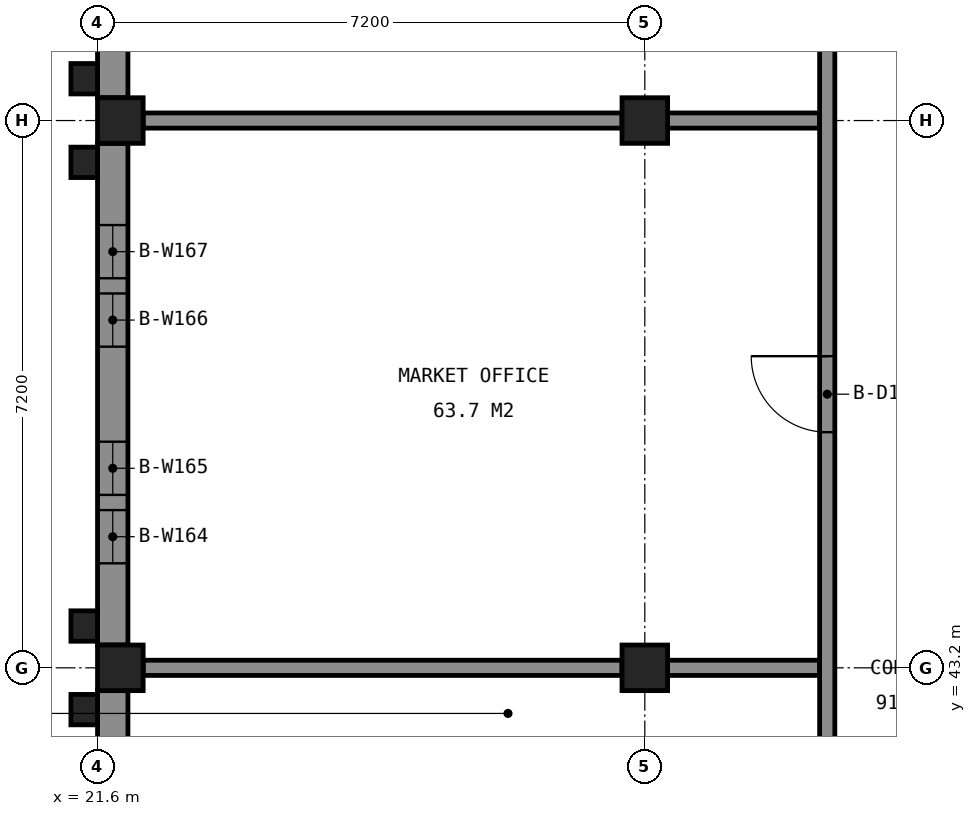
"""IFC4 building model, lengths in metres.
Left out: names, types, materials, properties, quantities, classifications, styles, units other than length and angle.
Written with IfcOpenShell. Run it as: python <this file> out.ifc"""

import sys

from ifc_helpers import new_model, si_unit, direction, frame, frame_2d, origin, origin_2d, place, context, subcontext, project, spatial, rectangle, extrude, element, fill, save


model = new_model("IFC4")
c1 = context("Model", 3, precision=1e-05, world=origin(), true_north=direction((0.0, 1.0)))
c2 = subcontext(c1, "Body", "Model", "MODEL_VIEW")
j1 = project(units=[si_unit("LENGTHUNIT", "METRE"), si_unit("PLANEANGLEUNIT", "RADIAN")], contexts=[c1])
p1 = place(None, origin())
s1 = spatial("IfcSite", under=j1, at=p1, CompositionType="ELEMENT")
p2 = place(p1, origin())
s2 = spatial("IfcBuilding", under=s1, at=p2, CompositionType="ELEMENT")
p3 = place(p2, frame((0.0, 0.0, 14.4)))
s3 = spatial("IfcBuildingStorey", under=s2, at=p3, CompositionType="ELEMENT", Elevation=14.4)
for number, where, z_axis, x_axis in (
    (1, (21.9, 43.2, 0.0), (0.0, 0.0, 1.0), (1.0, 0.0, 0.0)),
    (2, (21.9, 50.4, 0.0), (0.0, 0.0, 1.0), (1.0, 0.0, 0.0)),
):
    element("IfcColumn", number, at=place(p3, frame(where, z_axis=z_axis, x_axis=x_axis)), inside=s3, PredefinedType="COLUMN", context=c2, shape_type="SweptSolid", body=[
        extrude(rectangle(XDim=0.6, YDim=0.6, at=origin_2d()), origin(), (0.0, 0.0, 1.0), 4.144),
    ])
for number, where, z_axis, x_axis in (
    (3, (28.8, 43.2, 0.0), (0.0, 0.0, 1.0), (1.0, 0.0, 0.0)),
    (4, (28.8, 50.4, 0.0), (0.0, 0.0, 1.0), (1.0, 0.0, 0.0)),
):
    element("IfcColumn", number, at=place(p3, frame(where, z_axis=z_axis, x_axis=x_axis)), inside=s3, PredefinedType="COLUMN", context=c2, shape_type="SweptSolid", body=[
        extrude(rectangle(XDim=0.6, YDim=0.6, at=origin_2d()), origin(), (0.0, 0.0, 1.0), 4.911),
    ])
p4 = place(p3, frame((21.8, 36.3, 0.0), z_axis=(0.0, 0.0, 1.0), x_axis=(0.0, 1.0, 0.0)))
e5 = element("IfcWall", 5, at=p4, inside=s3, PredefinedType="SOLIDWALL", context=c2, shape_type="SweptSolid", body=[
    extrude(rectangle(XDim=6.6, YDim=0.4, at=frame_2d((3.3, 0.0))), origin(), (0.0, 0.0, 1.0), 4.133),
])
p5 = place(p4, frame((1.075, 0.0, 1.6)))
e6 = element("IfcOpeningElement", 6, at=p5, cuts=e5, PredefinedType="OPENING", context=c2, shape_type="SweptSolid", body=[
    extrude(rectangle(XDim=0.7, YDim=1.2, at=frame_2d((0.35, 0.6))), frame((0.0, 0.21, 0.0), z_axis=(0.0, -1.0, 0.0), x_axis=(1.0, 0.0, 0.0)), (0.0, 0.0, 1.0), 0.42),
])
p6 = place(p4, frame((1.975, 0.0, 1.6)))
e7 = element("IfcOpeningElement", 7, at=p6, cuts=e5, PredefinedType="OPENING", context=c2, shape_type="SweptSolid", body=[
    extrude(rectangle(XDim=0.7, YDim=1.2, at=frame_2d((0.35, 0.6))), frame((0.0, 0.21, 0.0), z_axis=(0.0, -1.0, 0.0), x_axis=(1.0, 0.0, 0.0)), (0.0, 0.0, 1.0), 0.42),
])
p7 = place(p4, frame((3.925, 0.0, 1.6)))
e8 = element("IfcOpeningElement", 8, at=p7, cuts=e5, PredefinedType="OPENING", context=c2, shape_type="SweptSolid", body=[
    extrude(rectangle(XDim=0.7, YDim=1.2, at=frame_2d((0.35, 0.6))), frame((0.0, 0.21, 0.0), z_axis=(0.0, -1.0, 0.0), x_axis=(1.0, 0.0, 0.0)), (0.0, 0.0, 1.0), 0.42),
])
p8 = place(p4, frame((4.825, 0.0, 1.6)))
e9 = element("IfcOpeningElement", 9, at=p8, cuts=e5, PredefinedType="OPENING", context=c2, shape_type="SweptSolid", body=[
    extrude(rectangle(XDim=0.7, YDim=1.2, at=frame_2d((0.35, 0.6))), frame((0.0, 0.21, 0.0), z_axis=(0.0, -1.0, 0.0), x_axis=(1.0, 0.0, 0.0)), (0.0, 0.0, 1.0), 0.42),
])
p9 = place(p3, frame((21.8, 43.5, 0.0), z_axis=(0.0, 0.0, 1.0), x_axis=(0.0, 1.0, 0.0)))
e10 = element("IfcWall", 10, at=p9, inside=s3, PredefinedType="SOLIDWALL", context=c2, shape_type="SweptSolid", body=[
    extrude(rectangle(XDim=6.6, YDim=0.4, at=frame_2d((3.3, 0.0))), origin(), (0.0, 0.0, 1.0), 4.133),
])
p10 = place(p9, frame((1.075, 0.0, 1.6)))
e11 = element("IfcOpeningElement", 11, at=p10, cuts=e10, PredefinedType="OPENING", context=c2, shape_type="SweptSolid", body=[
    extrude(rectangle(XDim=0.7, YDim=1.2, at=frame_2d((0.35, 0.6))), frame((0.0, 0.21, 0.0), z_axis=(0.0, -1.0, 0.0), x_axis=(1.0, 0.0, 0.0)), (0.0, 0.0, 1.0), 0.42),
])
p11 = place(p9, frame((1.975, 0.0, 1.6)))
e12 = element("IfcOpeningElement", 12, at=p11, cuts=e10, PredefinedType="OPENING", context=c2, shape_type="SweptSolid", body=[
    extrude(rectangle(XDim=0.7, YDim=1.2, at=frame_2d((0.35, 0.6))), frame((0.0, 0.21, 0.0), z_axis=(0.0, -1.0, 0.0), x_axis=(1.0, 0.0, 0.0)), (0.0, 0.0, 1.0), 0.42),
])
p12 = place(p9, frame((3.925, 0.0, 1.6)))
e13 = element("IfcOpeningElement", 13, at=p12, cuts=e10, PredefinedType="OPENING", context=c2, shape_type="SweptSolid", body=[
    extrude(rectangle(XDim=0.7, YDim=1.2, at=frame_2d((0.35, 0.6))), frame((0.0, 0.21, 0.0), z_axis=(0.0, -1.0, 0.0), x_axis=(1.0, 0.0, 0.0)), (0.0, 0.0, 1.0), 0.42),
])
p13 = place(p9, frame((4.825, 0.0, 1.6)))
e14 = element("IfcOpeningElement", 14, at=p13, cuts=e10, PredefinedType="OPENING", context=c2, shape_type="SweptSolid", body=[
    extrude(rectangle(XDim=0.7, YDim=1.2, at=frame_2d((0.35, 0.6))), frame((0.0, 0.21, 0.0), z_axis=(0.0, -1.0, 0.0), x_axis=(1.0, 0.0, 0.0)), (0.0, 0.0, 1.0), 0.42),
])
p14 = place(p3, frame((21.8, 50.7, 0.0), z_axis=(0.0, 0.0, 1.0), x_axis=(0.0, 1.0, 0.0)))
e15 = element("IfcWall", 15, at=p14, inside=s3, PredefinedType="SOLIDWALL", context=c2, shape_type="SweptSolid", body=[
    extrude(rectangle(XDim=6.6, YDim=0.4, at=frame_2d((3.3, 0.0))), origin(), (0.0, 0.0, 1.0), 4.133),
])
p15 = place(p14, frame((1.075, 0.0, 1.6)))
e16 = element("IfcOpeningElement", 16, at=p15, cuts=e15, PredefinedType="OPENING", context=c2, shape_type="SweptSolid", body=[
    extrude(rectangle(XDim=0.7, YDim=1.2, at=frame_2d((0.35, 0.6))), frame((0.0, 0.21, 0.0), z_axis=(0.0, -1.0, 0.0), x_axis=(1.0, 0.0, 0.0)), (0.0, 0.0, 1.0), 0.42),
])
p16 = place(p14, frame((1.975, 0.0, 1.6)))
e17 = element("IfcOpeningElement", 17, at=p16, cuts=e15, PredefinedType="OPENING", context=c2, shape_type="SweptSolid", body=[
    extrude(rectangle(XDim=0.7, YDim=1.2, at=frame_2d((0.35, 0.6))), frame((0.0, 0.21, 0.0), z_axis=(0.0, -1.0, 0.0), x_axis=(1.0, 0.0, 0.0)), (0.0, 0.0, 1.0), 0.42),
])
p17 = place(p14, frame((3.925, 0.0, 1.6)))
e18 = element("IfcOpeningElement", 18, at=p17, cuts=e15, PredefinedType="OPENING", context=c2, shape_type="SweptSolid", body=[
    extrude(rectangle(XDim=0.7, YDim=1.2, at=frame_2d((0.35, 0.6))), frame((0.0, 0.21, 0.0), z_axis=(0.0, -1.0, 0.0), x_axis=(1.0, 0.0, 0.0)), (0.0, 0.0, 1.0), 0.42),
])
p18 = place(p14, frame((4.825, 0.0, 1.6)))
e19 = element("IfcOpeningElement", 19, at=p18, cuts=e15, PredefinedType="OPENING", context=c2, shape_type="SweptSolid", body=[
    extrude(rectangle(XDim=0.7, YDim=1.2, at=frame_2d((0.35, 0.6))), frame((0.0, 0.21, 0.0), z_axis=(0.0, -1.0, 0.0), x_axis=(1.0, 0.0, 0.0)), (0.0, 0.0, 1.0), 0.42),
])
for number, where, z_axis, x_axis in (
    (20, (21.425, 42.65, 0.0), (0.0, 0.0, 1.0), (1.0, 0.0, 0.0)),
    (21, (21.425, 43.75, 0.0), (0.0, 0.0, 1.0), (1.0, 0.0, 0.0)),
    (22, (21.425, 49.85, 0.0), (0.0, 0.0, 1.0), (1.0, 0.0, 0.0)),
    (23, (21.425, 50.95, 0.0), (0.0, 0.0, 1.0), (1.0, 0.0, 0.0)),
):
    element("IfcColumn", number, at=place(p3, frame(where, z_axis=z_axis, x_axis=x_axis)), inside=s3, PredefinedType="COLUMN", context=c2, shape_type="SweptSolid", body=[
        extrude(rectangle(XDim=0.35, YDim=0.4, at=origin_2d()), origin(), (0.0, 0.0, 1.0), 4.1),
    ])
p19 = place(p3, frame((22.2, 43.2, 0.0), z_axis=(0.0, 0.0, 1.0), x_axis=(1.0, 0.0, 0.0)))
e24 = element("IfcWall", 24, at=p19, inside=s3, PredefinedType="PARTITIONING", context=c2, shape_type="SweptSolid", body=[
    extrude(rectangle(XDim=6.3, YDim=0.2, at=frame_2d((3.15, 0.0))), origin(), (0.0, 0.0, 1.0), 4.0),
])
p20 = place(p3, frame((29.1, 43.2, 0.0), z_axis=(0.0, 0.0, 1.0), x_axis=(1.0, 0.0, 0.0)))
e25 = element("IfcWall", 25, at=p20, inside=s3, PredefinedType="PARTITIONING", context=c2, shape_type="SweptSolid", body=[
    extrude(rectangle(XDim=2.0, YDim=0.2, at=frame_2d((1.0, 0.0))), origin(), (0.0, 0.0, 1.0), 4.0),
])
p21 = place(p3, frame((22.2, 50.4, 0.0), z_axis=(0.0, 0.0, 1.0), x_axis=(1.0, 0.0, 0.0)))
e26 = element("IfcWall", 26, at=p21, inside=s3, PredefinedType="PARTITIONING", context=c2, shape_type="SweptSolid", body=[
    extrude(rectangle(XDim=6.3, YDim=0.2, at=frame_2d((3.15, 0.0))), origin(), (0.0, 0.0, 1.0), 4.0),
])
p22 = place(p3, frame((29.1, 50.4, 0.0), z_axis=(0.0, 0.0, 1.0), x_axis=(1.0, 0.0, 0.0)))
e27 = element("IfcWall", 27, at=p22, inside=s3, PredefinedType="PARTITIONING", context=c2, shape_type="SweptSolid", body=[
    extrude(rectangle(XDim=2.0, YDim=0.2, at=frame_2d((1.0, 0.0))), origin(), (0.0, 0.0, 1.0), 4.0),
])
p23 = place(p3, frame((31.2, 29.2, 0.0), z_axis=(0.0, 0.0, 1.0), x_axis=(0.0, 1.0, 0.0)))
e28 = element("IfcWall", 28, at=p23, inside=s3, PredefinedType="PARTITIONING", context=c2, shape_type="SweptSolid", body=[
    extrude(rectangle(XDim=42.4, YDim=0.2, at=frame_2d((21.2, 0.0))), origin(), (0.0, 0.0, 1.0), 4.0),
])
p24 = place(p23, frame((2.7, 0.0, 0.0)))
e29 = element("IfcOpeningElement", 29, at=p24, cuts=e28, PredefinedType="OPENING", context=c2, shape_type="SweptSolid", body=[
    extrude(rectangle(XDim=1.0, YDim=2.1, at=frame_2d((0.5, 1.05))), frame((0.0, 0.11, 0.0), z_axis=(0.0, -1.0, 0.0), x_axis=(1.0, 0.0, 0.0)), (0.0, 0.0, 1.0), 0.22),
])
p25 = place(p23, frame((9.9, 0.0, 0.0)))
e30 = element("IfcOpeningElement", 30, at=p25, cuts=e28, PredefinedType="OPENING", context=c2, shape_type="SweptSolid", body=[
    extrude(rectangle(XDim=1.0, YDim=2.1, at=frame_2d((0.5, 1.05))), frame((0.0, 0.11, 0.0), z_axis=(0.0, -1.0, 0.0), x_axis=(1.0, 0.0, 0.0)), (0.0, 0.0, 1.0), 0.22),
])
p26 = place(p23, frame((17.1, 0.0, 0.0)))
e31 = element("IfcOpeningElement", 31, at=p26, cuts=e28, PredefinedType="OPENING", context=c2, shape_type="SweptSolid", body=[
    extrude(rectangle(XDim=1.0, YDim=2.1, at=frame_2d((0.5, 1.05))), frame((0.0, 0.11, 0.0), z_axis=(0.0, -1.0, 0.0), x_axis=(1.0, 0.0, 0.0)), (0.0, 0.0, 1.0), 0.22),
])
p27 = place(p23, frame((24.3, 0.0, 0.0)))
e32 = element("IfcOpeningElement", 32, at=p27, cuts=e28, PredefinedType="OPENING", context=c2, shape_type="SweptSolid", body=[
    extrude(rectangle(XDim=1.0, YDim=2.1, at=frame_2d((0.5, 1.05))), frame((0.0, 0.11, 0.0), z_axis=(0.0, -1.0, 0.0), x_axis=(1.0, 0.0, 0.0)), (0.0, 0.0, 1.0), 0.22),
])
p28 = place(p23, frame((31.5, 0.0, 0.0)))
e33 = element("IfcOpeningElement", 33, at=p28, cuts=e28, PredefinedType="OPENING", context=c2, shape_type="SweptSolid", body=[
    extrude(rectangle(XDim=1.0, YDim=2.1, at=frame_2d((0.5, 1.05))), frame((0.0, 0.11, 0.0), z_axis=(0.0, -1.0, 0.0), x_axis=(1.0, 0.0, 0.0)), (0.0, 0.0, 1.0), 0.22),
])
p29 = place(p23, frame((38.7, 0.0, 0.0)))
e34 = element("IfcOpeningElement", 34, at=p29, cuts=e28, PredefinedType="OPENING", context=c2, shape_type="SweptSolid", body=[
    extrude(rectangle(XDim=1.0, YDim=2.1, at=frame_2d((0.5, 1.05))), frame((0.0, 0.11, 0.0), z_axis=(0.0, -1.0, 0.0), x_axis=(1.0, 0.0, 0.0)), (0.0, 0.0, 1.0), 0.22),
])
p30 = place(p10, origin())
e35 = element("IfcWindow", 35, at=p30, inside=s3, PartitioningType="SINGLE_PANEL", PredefinedType="WINDOW", context=c2, shape_type="SweptSolid", body=[
    extrude(rectangle(XDim=0.7, YDim=1.2, at=frame_2d((0.35, 0.6))), frame((0.0, 0.03, 0.0), z_axis=(0.0, -1.0, 0.0), x_axis=(1.0, 0.0, 0.0)), (0.0, 0.0, 1.0), 0.06),
])
fill(e11, e35)
p31 = place(p11, origin())
e36 = element("IfcWindow", 36, at=p31, inside=s3, PartitioningType="SINGLE_PANEL", PredefinedType="WINDOW", context=c2, shape_type="SweptSolid", body=[
    extrude(rectangle(XDim=0.7, YDim=1.2, at=frame_2d((0.35, 0.6))), frame((0.0, 0.03, 0.0), z_axis=(0.0, -1.0, 0.0), x_axis=(1.0, 0.0, 0.0)), (0.0, 0.0, 1.0), 0.06),
])
fill(e12, e36)
p32 = place(p12, origin())
e37 = element("IfcWindow", 37, at=p32, inside=s3, PartitioningType="SINGLE_PANEL", PredefinedType="WINDOW", context=c2, shape_type="SweptSolid", body=[
    extrude(rectangle(XDim=0.7, YDim=1.2, at=frame_2d((0.35, 0.6))), frame((0.0, 0.03, 0.0), z_axis=(0.0, -1.0, 0.0), x_axis=(1.0, 0.0, 0.0)), (0.0, 0.0, 1.0), 0.06),
])
fill(e13, e37)
p33 = place(p13, origin())
e38 = element("IfcWindow", 38, at=p33, inside=s3, PartitioningType="SINGLE_PANEL", PredefinedType="WINDOW", context=c2, shape_type="SweptSolid", body=[
    extrude(rectangle(XDim=0.7, YDim=1.2, at=frame_2d((0.35, 0.6))), frame((0.0, 0.03, 0.0), z_axis=(0.0, -1.0, 0.0), x_axis=(1.0, 0.0, 0.0)), (0.0, 0.0, 1.0), 0.06),
])
fill(e14, e38)
p34 = place(p26, origin())
e39 = element("IfcDoor", 39, at=p34, inside=s3, OperationType="SINGLE_SWING_RIGHT", PredefinedType="DOOR", context=c2, shape_type="SweptSolid", body=[
    extrude(rectangle(XDim=1.0, YDim=2.1, at=frame_2d((0.5, 1.05))), frame((0.0, 0.025, 0.0), z_axis=(0.0, -1.0, 0.0), x_axis=(1.0, 0.0, 0.0)), (0.0, 0.0, 1.0), 0.05),
])
fill(e31, e39)
save(model, sys.argv[1])
